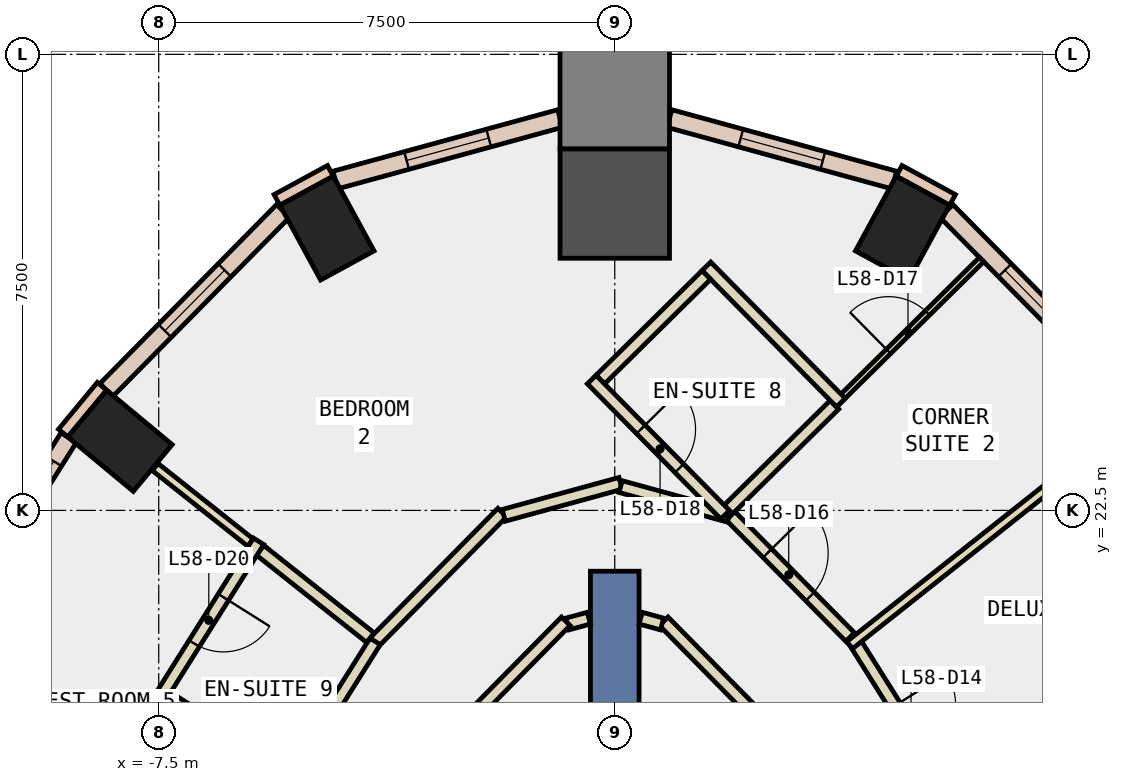
"""IFC4 building model, lengths in metres.
Left out: names, types, materials, properties, quantities, classifications, styles, units other than length and angle.
Written with IfcOpenShell. Run it as: python <this file> out.ifc"""

import sys

from ifc_helpers import new_model, si_unit, direction, frame, frame_2d, origin, origin_2d, place, context, subcontext, project, spatial, rectangle, extrude, element, fill, save


model = new_model("IFC4")
c1 = context("Model", 3, precision=1e-05, world=origin(), true_north=direction((0.0, 1.0)))
c2 = subcontext(c1, "Body", "Model", "MODEL_VIEW")
j1 = project(units=[si_unit("LENGTHUNIT", "METRE"), si_unit("PLANEANGLEUNIT", "RADIAN")], contexts=[c1])
p1 = place(None, origin())
s1 = spatial("IfcSite", under=j1, at=p1, CompositionType="ELEMENT")
p2 = place(p1, origin())
s2 = spatial("IfcBuilding", under=s1, at=p2, CompositionType="ELEMENT")
p3 = place(p2, frame((0.0, 0.0, 255.8)))
s3 = spatial("IfcBuildingStorey", under=s2, at=p3, CompositionType="ELEMENT", Elevation=255.8)
p4 = place(p3, frame((4.733, 27.143, -0.34), z_axis=(0.0, 0.0, 1.0), x_axis=(-0.87817506391, 0.478339374426, 0.0)))
e1 = element("IfcColumn", 1, at=p4, inside=s3, PredefinedType="COLUMN", context=c2, shape_type="SweptSolid", body=[
    extrude(rectangle(XDim=1.0, YDim=1.4, at=origin_2d()), origin(), (0.0, 0.0, 1.0), 3.6),
])
p5 = place(p3, frame((0.0, 27.547, -0.34), z_axis=(0.0, 0.0, 1.0), x_axis=(0.0, 1.0, 0.0)))
e2 = element("IfcColumn", 2, at=p5, inside=s3, PredefinedType="COLUMN", context=c2, shape_type="SweptSolid", body=[
    extrude(rectangle(XDim=1.8, YDim=1.8, at=origin_2d()), origin(), (0.0, 0.0, 1.0), 3.6),
])
for number, where, z_axis, x_axis in (
    (3, (-4.733, 27.143, -0.34), (0.0, 0.0, 1.0), (0.878, 0.478, 0.0)),
    (4, (-8.137, 23.645, -0.34), (0.0, 0.0, 1.0), (0.639, 0.769, 0.0)),
):
    element("IfcColumn", number, at=place(p3, frame(where, z_axis=z_axis, x_axis=x_axis)), inside=s3, PredefinedType="COLUMN", context=c2, shape_type="SweptSolid", body=[
        extrude(rectangle(XDim=1.0, YDim=1.4, at=origin_2d()), origin(), (0.0, 0.0, 1.0), 3.6),
    ])
p6 = place(p3, frame((0.0, 29.347, -0.34), z_axis=(0.0, 0.0, 1.0), x_axis=(0.0, 1.0, 0.0)))
e5 = element("IfcColumn", 5, at=p6, inside=s3, PredefinedType="COLUMN", context=c2, shape_type="SweptSolid", body=[
    extrude(rectangle(XDim=1.8, YDim=1.8, at=origin_2d()), origin(), (0.0, 0.0, 1.0), 3.6),
])
p7 = place(p3, frame((0.0, 12.5, -0.34), z_axis=(0.0, 0.0, 1.0), x_axis=(0.0, 1.0, 0.0)))
e6 = element("IfcWall", 6, at=p7, inside=s3, PredefinedType="SHEAR", context=c2, shape_type="SweptSolid", body=[
    extrude(rectangle(XDim=9.0, YDim=0.8, at=frame_2d((4.5, 0.0))), origin(), (0.0, 0.0, 1.0), 3.6),
])
for number, where, z_axis, x_axis in (
    (7, (5.555, 27.606, 0.0), (0.0, 0.0, 1.0), (-0.878, 0.478, 0.0)),
    (8, (-4.677, 28.084, 0.0), (0.0, 0.0, 1.0), (-0.878, -0.478, 0.0)),
):
    element("IfcWall", number, at=place(p3, frame(where, z_axis=z_axis, x_axis=x_axis)), inside=s3, PredefinedType="STANDARD", context=c2, shape_type="SweptSolid", body=[
        extrude(rectangle(XDim=1.0, YDim=0.2, at=frame_2d((0.5, 0.0))), origin(), (0.0, 0.0, 1.0), 3.26),
    ])
p8 = place(p3, frame((-8.433, 24.541, 0.0), z_axis=(0.0, 0.0, 1.0), x_axis=(-0.637972365578, -0.770059257953, 0.0)))
e9 = element("IfcWall", 9, at=p8, inside=s3, PredefinedType="STANDARD", context=c2, shape_type="SweptSolid", body=[
    extrude(rectangle(XDim=1.0, YDim=0.2, at=frame_2d((0.5, 0.0))), origin(), (0.0, 0.0, 1.0), 3.26),
])
p9 = place(p3, frame((8.361, 24.48, 0.0), z_axis=(0.0, 0.0, 1.0), x_axis=(-0.702488411246, 0.711695181989, 0.0)))
e10 = element("IfcWall", 10, at=p9, inside=s3, PredefinedType="STANDARD", context=c2, shape_type="SweptSolid", body=[
    extrude(rectangle(XDim=4.137, YDim=0.3, at=frame_2d((2.068, 0.0))), origin(), (0.0, 0.0, 1.0), 3.26),
])
p10 = place(p9, frame((1.368, 0.0, 0.9)))
e11 = element("IfcOpeningElement", 11, at=p10, cuts=e10, PredefinedType="OPENING", context=c2, shape_type="SweptSolid", body=[
    extrude(rectangle(XDim=1.4, YDim=2.0, at=frame_2d((0.7, 1.0))), frame((0.0, 0.16, 0.0), z_axis=(0.0, -1.0, 0.0), x_axis=(1.0, 0.0, 0.0)), (0.0, 0.0, 1.0), 0.32),
])
p11 = place(p3, frame((4.596, 27.933, 0.0), z_axis=(0.0, 0.0, 1.0), x_axis=(-0.964519409105, 0.264011949464, 0.0)))
e12 = element("IfcWall", 12, at=p11, inside=s3, PredefinedType="STANDARD", context=c2, shape_type="SweptSolid", body=[
    extrude(rectangle(XDim=3.833, YDim=0.3, at=frame_2d((1.917, 0.0))), origin(), (0.0, 0.0, 1.0), 3.26),
])
p12 = place(p11, frame((1.217, 0.0, 0.9)))
e13 = element("IfcOpeningElement", 13, at=p12, cuts=e12, PredefinedType="OPENING", context=c2, shape_type="SweptSolid", body=[
    extrude(rectangle(XDim=1.4, YDim=2.0, at=frame_2d((0.7, 1.0))), frame((0.0, 0.16, 0.0), z_axis=(0.0, -1.0, 0.0), x_axis=(1.0, 0.0, 0.0)), (0.0, 0.0, 1.0), 0.32),
])
p13 = place(p3, frame((-0.899, 28.945, 0.0), z_axis=(0.0, 0.0, 1.0), x_axis=(-0.964519409105, -0.264011949464, 0.0)))
e14 = element("IfcWall", 14, at=p13, inside=s3, PredefinedType="STANDARD", context=c2, shape_type="SweptSolid", body=[
    extrude(rectangle(XDim=3.833, YDim=0.3, at=frame_2d((1.917, 0.0))), origin(), (0.0, 0.0, 1.0), 3.26),
])
p14 = place(p13, frame((1.217, 0.0, 0.9)))
e15 = element("IfcOpeningElement", 15, at=p14, cuts=e14, PredefinedType="OPENING", context=c2, shape_type="SweptSolid", body=[
    extrude(rectangle(XDim=1.4, YDim=2.0, at=frame_2d((0.7, 1.0))), frame((0.0, 0.16, 0.0), z_axis=(0.0, -1.0, 0.0), x_axis=(1.0, 0.0, 0.0)), (0.0, 0.0, 1.0), 0.32),
])
p15 = place(p3, frame((-5.455, 27.424, 0.0), z_axis=(0.0, 0.0, 1.0), x_axis=(-0.702488411246, -0.711695181989, 0.0)))
e16 = element("IfcWall", 16, at=p15, inside=s3, PredefinedType="STANDARD", context=c2, shape_type="SweptSolid", body=[
    extrude(rectangle(XDim=4.137, YDim=0.3, at=frame_2d((2.068, 0.0))), origin(), (0.0, 0.0, 1.0), 3.26),
])
p16 = place(p15, frame((1.368, 0.0, 0.9)))
e17 = element("IfcOpeningElement", 17, at=p16, cuts=e16, PredefinedType="OPENING", context=c2, shape_type="SweptSolid", body=[
    extrude(rectangle(XDim=1.4, YDim=2.0, at=frame_2d((0.7, 1.0))), frame((0.0, 0.16, 0.0), z_axis=(0.0, -1.0, 0.0), x_axis=(1.0, 0.0, 0.0)), (0.0, 0.0, 1.0), 0.32),
])
p17 = place(p3, frame((-8.981, 23.697, 0.0), z_axis=(0.0, 0.0, 1.0), x_axis=(-0.532558226688, -0.846393369059, 0.0)))
e18 = element("IfcWall", 18, at=p17, inside=s3, PredefinedType="STANDARD", context=c2, shape_type="SweptSolid", body=[
    extrude(rectangle(XDim=5.637, YDim=0.3, at=frame_2d((2.818, 0.0))), origin(), (0.0, 0.0, 1.0), 3.26),
])
p18 = place(p17, frame((0.459, 0.0, 0.9)))
e19 = element("IfcOpeningElement", 19, at=p18, cuts=e18, PredefinedType="OPENING", context=c2, shape_type="SweptSolid", body=[
    extrude(rectangle(XDim=1.9, YDim=2.0, at=frame_2d((0.95, 1.0))), frame((0.0, 0.16, 0.0), z_axis=(0.0, -1.0, 0.0), x_axis=(1.0, 0.0, 0.0)), (0.0, 0.0, 1.0), 0.32),
])
p19 = place(p17, frame((3.278, 0.0, 0.9)))
e20 = element("IfcOpeningElement", 20, at=p19, cuts=e18, PredefinedType="OPENING", context=c2, shape_type="SweptSolid", body=[
    extrude(rectangle(XDim=1.9, YDim=2.0, at=frame_2d((0.95, 1.0))), frame((0.0, 0.16, 0.0), z_axis=(0.0, -1.0, 0.0), x_axis=(1.0, 0.0, 0.0)), (0.0, 0.0, 1.0), 0.32),
])
p20 = place(p3, frame((2.294, 19.167, 0.0), z_axis=(0.0, 0.0, 1.0), x_axis=(-0.70213913596, 0.712039769784, 0.0)))
e21 = element("IfcWall", 21, at=p20, inside=s3, PredefinedType="PARTITIONING", context=c2, shape_type="SweptSolid", body=[
    extrude(rectangle(XDim=2.121, YDim=0.2, at=frame_2d((1.06, 0.0))), origin(), (0.0, 0.0, 1.0), 3.26),
])
for number, where, z_axis, x_axis in (
    (22, (0.778, 20.632, 0.0), (0.0, 0.0, 1.0), (-0.965, 0.263, 0.0)),
    (23, (-0.426, 20.728, 0.0), (0.0, 0.0, 1.0), (-0.965, -0.263, 0.0)),
):
    element("IfcWall", number, at=place(p3, frame(where, z_axis=z_axis, x_axis=x_axis)), inside=s3, PredefinedType="PARTITIONING", context=c2, shape_type="SweptSolid", body=[
        extrude(rectangle(XDim=0.365, YDim=0.2, at=frame_2d((0.183, 0.0))), origin(), (0.0, 0.0, 1.0), 3.26),
    ])
p21 = place(p3, frame((-0.805, 20.677, 0.0), z_axis=(0.0, 0.0, 1.0), x_axis=(-0.70213913596, -0.712039769784, 0.0)))
e24 = element("IfcWall", 24, at=p21, inside=s3, PredefinedType="PARTITIONING", context=c2, shape_type="SweptSolid", body=[
    extrude(rectangle(XDim=2.121, YDim=0.2, at=frame_2d((1.06, 0.0))), origin(), (0.0, 0.0, 1.0), 3.26),
])
p22 = place(p3, frame((3.928, 20.367, 0.0), z_axis=(0.0, 0.0, 1.0), x_axis=(0.532616247911, -0.846356858814, 0.0)))
e25 = element("IfcWall", 25, at=p22, inside=s3, PredefinedType="PARTITIONING", context=c2, shape_type="SweptSolid", body=[
    extrude(rectangle(XDim=3.451, YDim=0.2, at=frame_2d((1.726, 0.0))), origin(), (0.0, 0.0, 1.0), 3.26),
])
p23 = place(p22, frame((1.275, 0.0, 0.0)))
e26 = element("IfcOpeningElement", 26, at=p23, cuts=e25, PredefinedType="OPENING", context=c2, shape_type="SweptSolid", body=[
    extrude(rectangle(XDim=1.0, YDim=2.1, at=frame_2d((0.5, 1.05))), frame((0.0, 0.11, 0.0), z_axis=(0.0, -1.0, 0.0), x_axis=(1.0, 0.0, 0.0)), (0.0, 0.0, 1.0), 0.22),
])
p24 = place(p3, frame((1.851, 22.464, 0.0), z_axis=(0.0, 0.0, 1.0), x_axis=(0.70237969133, -0.711802479068, 0.0)))
e27 = element("IfcWall", 27, at=p24, inside=s3, PredefinedType="PARTITIONING", context=c2, shape_type="SweptSolid", body=[
    extrude(rectangle(XDim=2.876, YDim=0.2, at=frame_2d((1.438, 0.0))), origin(), (0.0, 0.0, 1.0), 3.26),
])
p25 = place(p24, frame((0.938, 0.0, 0.0)))
e28 = element("IfcOpeningElement", 28, at=p25, cuts=e27, PredefinedType="OPENING", context=c2, shape_type="SweptSolid", body=[
    extrude(rectangle(XDim=1.0, YDim=2.1, at=frame_2d((0.5, 1.05))), frame((0.0, 0.11, 0.0), z_axis=(0.0, -1.0, 0.0), x_axis=(1.0, 0.0, 0.0)), (0.0, 0.0, 1.0), 0.22),
])
p26 = place(p3, frame((-4.012, 20.275, 0.0), z_axis=(0.0, 0.0, 1.0), x_axis=(0.702488437915, 0.711695155664, 0.0)))
e29 = element("IfcWall", 29, at=p26, inside=s3, PredefinedType="PARTITIONING", context=c2, shape_type="SweptSolid", body=[
    extrude(rectangle(XDim=3.076, YDim=0.2, at=frame_2d((1.538, 0.0))), origin(), (0.0, 0.0, 1.0), 3.26),
])
p27 = place(p3, frame((-1.825, 22.419, 0.0), z_axis=(0.0, 0.0, 1.0), x_axis=(0.964477541401, 0.26416485787, 0.0)))
e30 = element("IfcWall", 30, at=p27, inside=s3, PredefinedType="PARTITIONING", context=c2, shape_type="SweptSolid", body=[
    extrude(rectangle(XDim=1.992, YDim=0.2, at=frame_2d((0.996, 0.0))), origin(), (0.0, 0.0, 1.0), 3.26),
])
p28 = place(p3, frame((0.096, 22.892, 0.0), z_axis=(0.0, 0.0, 1.0), x_axis=(0.964519582336, -0.264011316595, 0.0)))
e31 = element("IfcWall", 31, at=p28, inside=s3, PredefinedType="PARTITIONING", context=c2, shape_type="SweptSolid", body=[
    extrude(rectangle(XDim=1.849, YDim=0.2, at=frame_2d((0.924, 0.0))), origin(), (0.0, 0.0, 1.0), 3.26),
])
p29 = place(p3, frame((-5.273, 18.23, 0.0), z_axis=(0.0, 0.0, 1.0), x_axis=(0.532743344325, 0.846276863135, 0.0)))
e32 = element("IfcWall", 32, at=p29, inside=s3, PredefinedType="PARTITIONING", context=c2, shape_type="SweptSolid", body=[
    extrude(rectangle(XDim=2.5, YDim=0.2, at=frame_2d((1.25, 0.0))), origin(), (0.0, 0.0, 1.0), 3.26),
])
p30 = place(p3, frame((3.863, 20.284, 0.0), z_axis=(0.0, 0.0, 1.0), x_axis=(0.783618453885, 0.621242399335, 0.0)))
e33 = element("IfcWall", 33, at=p30, inside=s3, PredefinedType="PARTITIONING", context=c2, shape_type="SweptSolid", body=[
    extrude(rectangle(XDim=4.717, YDim=0.15, at=frame_2d((2.358, 0.0))), origin(), (0.0, 0.0, 1.0), 3.26),
])
p31 = place(p3, frame((3.613, 24.237, 0.0), z_axis=(0.0, 0.0, 1.0), x_axis=(0.711651188682, 0.702532978335, 0.0)))
e34 = element("IfcWall", 34, at=p31, inside=s3, PredefinedType="PARTITIONING", context=c2, shape_type="SweptSolid", body=[
    extrude(rectangle(XDim=3.4, YDim=0.1, at=frame_2d((1.7, 0.0))), origin(), (0.0, 0.0, 1.0), 3.26),
])
p32 = place(p31, frame((1.25, 0.0, 0.0)))
e35 = element("IfcOpeningElement", 35, at=p32, cuts=e34, PredefinedType="OPENING", context=c2, shape_type="SweptSolid", body=[
    extrude(rectangle(XDim=0.9, YDim=2.1, at=frame_2d((0.45, 1.05))), frame((0.0, 0.06, 0.0), z_axis=(0.0, -1.0, 0.0), x_axis=(1.0, 0.0, 0.0)), (0.0, 0.0, 1.0), 0.12),
])
p33 = place(p3, frame((1.798, 22.446, 0.0), z_axis=(0.0, 0.0, 1.0), x_axis=(0.711782817297, 0.702399616316, 0.0)))
e36 = element("IfcWall", 36, at=p33, inside=s3, PredefinedType="PARTITIONING", context=c2, shape_type="SweptSolid", body=[
    extrude(rectangle(XDim=2.55, YDim=0.2, at=frame_2d((1.275, 0.0))), origin(), (0.0, 0.0, 1.0), 3.26),
])
p34 = place(p3, frame((3.719, 24.272, 0.0), z_axis=(0.0, 0.0, 1.0), x_axis=(-0.70232328337, 0.711858135893, 0.0)))
e37 = element("IfcWall", 37, at=p34, inside=s3, PredefinedType="PARTITIONING", context=c2, shape_type="SweptSolid", body=[
    extrude(rectangle(XDim=3.149, YDim=0.2, at=frame_2d((1.575, 0.0))), origin(), (0.0, 0.0, 1.0), 3.26),
])
p35 = place(p3, frame((1.506, 26.372, 0.0), z_axis=(0.0, 0.0, 1.0), x_axis=(-0.711773999329, -0.702408551969, 0.0)))
e38 = element("IfcWall", 38, at=p35, inside=s3, PredefinedType="PARTITIONING", context=c2, shape_type="SweptSolid", body=[
    extrude(rectangle(XDim=2.45, YDim=0.2, at=frame_2d((1.225, 0.0))), origin(), (0.0, 0.0, 1.0), 3.26),
])
p36 = place(p3, frame((-0.379, 24.652, 0.0), z_axis=(0.0, 0.0, 1.0), x_axis=(0.702559610983, -0.711624896286, 0.0)))
e39 = element("IfcWall", 39, at=p36, inside=s3, PredefinedType="PARTITIONING", context=c2, shape_type="SweptSolid", body=[
    extrude(rectangle(XDim=3.124, YDim=0.2, at=frame_2d((1.562, 0.0))), origin(), (0.0, 0.0, 1.0), 3.26),
])
p37 = place(p36, frame((1.15, 0.0, 0.0)))
e40 = element("IfcOpeningElement", 40, at=p37, cuts=e39, PredefinedType="OPENING", context=c2, shape_type="SweptSolid", body=[
    extrude(rectangle(XDim=0.9, YDim=2.1, at=frame_2d((0.45, 1.05))), frame((0.0, 0.11, 0.0), z_axis=(0.0, -1.0, 0.0), x_axis=(1.0, 0.0, 0.0)), (0.0, 0.0, 1.0), 0.22),
])
p38 = place(p3, frame((-5.99, 21.97, 0.0), z_axis=(0.0, 0.0, 1.0), x_axis=(-0.783573405437, 0.621299218003, 0.0)))
e41 = element("IfcWall", 41, at=p38, inside=s3, PredefinedType="PARTITIONING", context=c2, shape_type="SweptSolid", body=[
    extrude(rectangle(XDim=2.002, YDim=0.15, at=frame_2d((1.001, 0.0))), origin(), (0.0, 0.0, 1.0), 3.26),
])
p39 = place(p3, frame((-4.02, 20.408, 0.0), z_axis=(0.0, 0.0, 1.0), x_axis=(-0.783681902275, 0.621162358846, 0.0)))
e42 = element("IfcWall", 42, at=p39, inside=s3, PredefinedType="PARTITIONING", context=c2, shape_type="SweptSolid", body=[
    extrude(rectangle(XDim=2.313, YDim=0.2, at=frame_2d((1.157, 0.0))), origin(), (0.0, 0.0, 1.0), 3.26),
])
p40 = place(p3, frame((-5.858, 21.992, 0.0), z_axis=(0.0, 0.0, 1.0), x_axis=(-0.532874387162, -0.846194355634, 0.0)))
e43 = element("IfcWall", 43, at=p40, inside=s3, PredefinedType="PARTITIONING", context=c2, shape_type="SweptSolid", body=[
    extrude(rectangle(XDim=3.073, YDim=0.2, at=frame_2d((1.536, 0.0))), origin(), (0.0, 0.0, 1.0), 3.26),
])
p41 = place(p40, frame((1.086, 0.0, 0.0)))
e44 = element("IfcOpeningElement", 44, at=p41, cuts=e43, PredefinedType="OPENING", context=c2, shape_type="SweptSolid", body=[
    extrude(rectangle(XDim=0.9, YDim=2.1, at=frame_2d((0.45, 1.05))), frame((0.0, 0.11, 0.0), z_axis=(0.0, -1.0, 0.0), x_axis=(1.0, 0.0, 0.0)), (0.0, 0.0, 1.0), 0.22),
])
p42 = place(p3, frame((-7.357, 19.423, 0.0), z_axis=(0.0, 0.0, 1.0), x_axis=(0.846270070045, -0.532754135176, 0.0)))
e45 = element("IfcWall", 45, at=p42, inside=s3, PredefinedType="PARTITIONING", context=c2, shape_type="SweptSolid", body=[
    extrude(rectangle(XDim=2.3, YDim=0.2, at=frame_2d((1.15, 0.0))), origin(), (0.0, 0.0, 1.0), 3.26),
])
p43 = place(p10, origin())
e46 = element("IfcWindow", 46, at=p43, inside=s3, PartitioningType="SINGLE_PANEL", PredefinedType="WINDOW", context=c2, shape_type="SweptSolid", body=[
    extrude(rectangle(XDim=1.4, YDim=2.0, at=frame_2d((0.7, 1.0))), frame((0.0, 0.03, 0.0), z_axis=(0.0, -1.0, 0.0), x_axis=(1.0, 0.0, 0.0)), (0.0, 0.0, 1.0), 0.06),
])
fill(e11, e46)
p44 = place(p12, origin())
e47 = element("IfcWindow", 47, at=p44, inside=s3, PartitioningType="SINGLE_PANEL", PredefinedType="WINDOW", context=c2, shape_type="SweptSolid", body=[
    extrude(rectangle(XDim=1.4, YDim=2.0, at=frame_2d((0.7, 1.0))), frame((0.0, 0.03, 0.0), z_axis=(0.0, -1.0, 0.0), x_axis=(1.0, 0.0, 0.0)), (0.0, 0.0, 1.0), 0.06),
])
fill(e13, e47)
p45 = place(p14, origin())
e48 = element("IfcWindow", 48, at=p45, inside=s3, PartitioningType="SINGLE_PANEL", PredefinedType="WINDOW", context=c2, shape_type="SweptSolid", body=[
    extrude(rectangle(XDim=1.4, YDim=2.0, at=frame_2d((0.7, 1.0))), frame((0.0, 0.03, 0.0), z_axis=(0.0, -1.0, 0.0), x_axis=(1.0, 0.0, 0.0)), (0.0, 0.0, 1.0), 0.06),
])
fill(e15, e48)
p46 = place(p16, origin())
e49 = element("IfcWindow", 49, at=p46, inside=s3, PartitioningType="SINGLE_PANEL", PredefinedType="WINDOW", context=c2, shape_type="SweptSolid", body=[
    extrude(rectangle(XDim=1.4, YDim=2.0, at=frame_2d((0.7, 1.0))), frame((0.0, 0.03, 0.0), z_axis=(0.0, -1.0, 0.0), x_axis=(1.0, 0.0, 0.0)), (0.0, 0.0, 1.0), 0.06),
])
fill(e17, e49)
p47 = place(p18, origin())
e50 = element("IfcWindow", 50, at=p47, inside=s3, PartitioningType="SINGLE_PANEL", PredefinedType="WINDOW", context=c2, shape_type="SweptSolid", body=[
    extrude(rectangle(XDim=1.9, YDim=2.0, at=frame_2d((0.95, 1.0))), frame((0.0, 0.03, 0.0), z_axis=(0.0, -1.0, 0.0), x_axis=(1.0, 0.0, 0.0)), (0.0, 0.0, 1.0), 0.06),
])
fill(e19, e50)
p48 = place(p25, origin())
e51 = element("IfcDoor", 51, at=p48, inside=s3, OperationType="SINGLE_SWING_LEFT", PredefinedType="DOOR", context=c2, shape_type="SweptSolid", body=[
    extrude(rectangle(XDim=1.0, YDim=2.1, at=frame_2d((0.5, 1.05))), frame((0.0, 0.025, 0.0), z_axis=(0.0, -1.0, 0.0), x_axis=(1.0, 0.0, 0.0)), (0.0, 0.0, 1.0), 0.05),
])
fill(e28, e51)
p49 = place(p32, origin())
e52 = element("IfcDoor", 52, at=p49, inside=s3, OperationType="SINGLE_SWING_RIGHT", PredefinedType="DOOR", context=c2, shape_type="SweptSolid", body=[
    extrude(rectangle(XDim=0.9, YDim=2.1, at=frame_2d((0.45, 1.05))), frame((0.0, 0.025, 0.0), z_axis=(0.0, -1.0, 0.0), x_axis=(1.0, 0.0, 0.0)), (0.0, 0.0, 1.0), 0.05),
])
fill(e35, e52)
p50 = place(p37, origin())
e53 = element("IfcDoor", 53, at=p50, inside=s3, OperationType="SINGLE_SWING_RIGHT", PredefinedType="DOOR", context=c2, shape_type="SweptSolid", body=[
    extrude(rectangle(XDim=0.9, YDim=2.1, at=frame_2d((0.45, 1.05))), frame((0.0, 0.025, 0.0), z_axis=(0.0, -1.0, 0.0), x_axis=(1.0, 0.0, 0.0)), (0.0, 0.0, 1.0), 0.05),
])
fill(e40, e53)
p51 = place(p41, origin())
e54 = element("IfcDoor", 54, at=p51, inside=s3, OperationType="SINGLE_SWING_LEFT", PredefinedType="DOOR", context=c2, shape_type="SweptSolid", body=[
    extrude(rectangle(XDim=0.9, YDim=2.1, at=frame_2d((0.45, 1.05))), frame((0.0, 0.025, 0.0), z_axis=(0.0, -1.0, 0.0), x_axis=(1.0, 0.0, 0.0)), (0.0, 0.0, 1.0), 0.05),
])
fill(e44, e54)
save(model, sys.argv[1])
